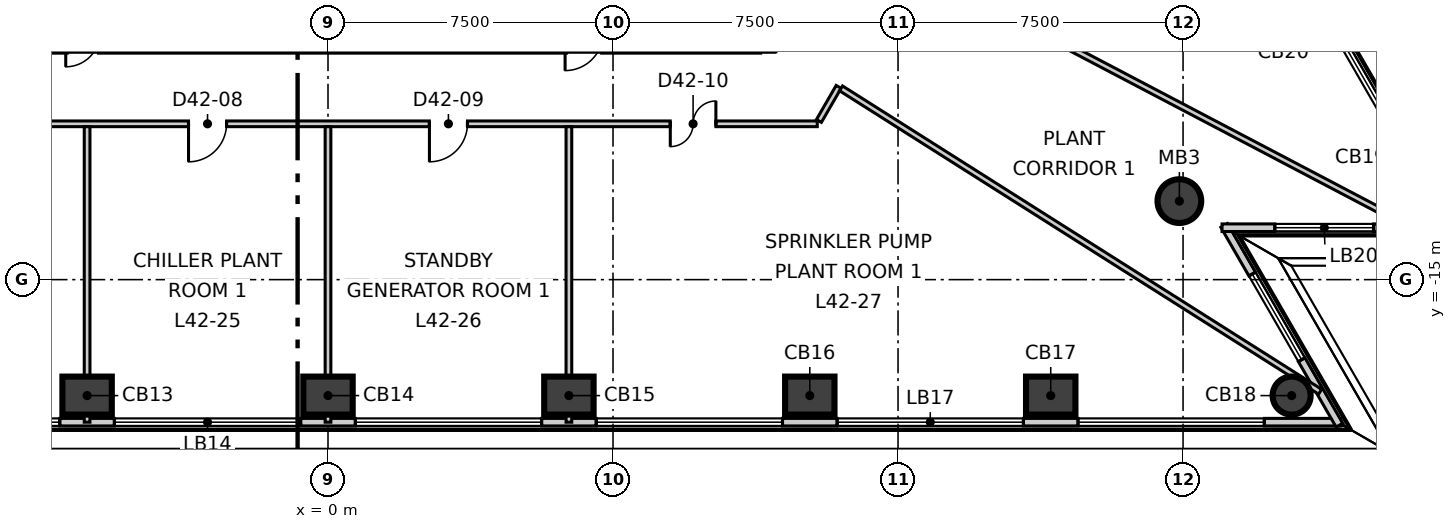
"""IFC4 building model, lengths in metres.
Left out: names, types, materials, properties, quantities, classifications, styles, units other than length and angle.
Written with IfcOpenShell. Run it as: python <this file> out.ifc"""

import sys

from ifc_helpers import new_model, si_unit, direction, frame, frame_2d, origin, origin_2d, place, context, subcontext, project, spatial, rectangle, circle, extrude, element, fill, save


model = new_model("IFC4")
c1 = context("Model", 3, precision=1e-05, world=origin(), true_north=direction((0.0, 1.0)))
c2 = subcontext(c1, "Body", "Model", "MODEL_VIEW")
j1 = project(units=[si_unit("LENGTHUNIT", "METRE"), si_unit("PLANEANGLEUNIT", "RADIAN")], contexts=[c1])
p1 = place(None, origin())
s1 = spatial("IfcSite", under=j1, at=p1, CompositionType="ELEMENT")
p2 = place(p1, origin())
s2 = spatial("IfcBuilding", under=s1, at=p2, CompositionType="ELEMENT")
p3 = place(p2, frame((0.0, 0.0, 180.8)))
s3 = spatial("IfcBuildingStorey", under=s2, at=p3, CompositionType="ELEMENT", Elevation=180.8)
for number, where, z_axis, x_axis in (
    (1, (-6.339, -18.051, -0.6), (0.0, 0.0, 1.0), (1.0, 0.0, 0.0)),
    (2, (0.0, -18.051, -0.6), (0.0, 0.0, 1.0), (1.0, 0.0, 0.0)),
    (3, (6.339, -18.051, -0.6), (0.0, 0.0, 1.0), (1.0, 0.0, 0.0)),
    (4, (12.678, -18.051, -0.6), (0.0, 0.0, 1.0), (1.0, 0.0, 0.0)),
    (5, (19.018, -18.051, -0.6), (0.0, 0.0, 1.0), (1.0, 0.0, 0.0)),
):
    element("IfcColumn", number, at=place(p3, frame(where, z_axis=z_axis, x_axis=x_axis)), inside=s3, PredefinedType="COLUMN", context=c2, shape_type="SweptSolid", body=[
        extrude(rectangle(XDim=1.3, YDim=1.0, at=origin_2d()), origin(), (0.0, 0.0, 1.0), 4.5),
    ])
p4 = place(p3, frame((25.357, -18.051, -0.6), z_axis=(0.0, 0.0, 1.0), x_axis=(1.0, 0.0, 0.0)))
e6 = element("IfcColumn", 6, at=p4, inside=s3, PredefinedType="COLUMN", context=c2, shape_type="SweptSolid", body=[
    extrude(circle(Radius=0.5, at=origin_2d()), origin(), (0.0, 0.0, 1.0), 4.5),
])
p5 = place(p3, frame((22.403, -12.934, -0.6), z_axis=(0.0, 0.0, 1.0), x_axis=(1.0, 0.0, 0.0)))
e7 = element("IfcColumn", 7, at=p5, inside=s3, PredefinedType="COLUMN", context=c2, shape_type="SweptSolid", body=[
    extrude(circle(Radius=0.575, at=origin_2d()), origin(), (0.0, 0.0, 1.0), 4.5),
])
p6 = place(p3, frame((-2.909, 32.463, 0.0), z_axis=(0.0, 0.0, 1.0), x_axis=(-0.500011769953, -0.866018608292, 0.0)))
e8 = element("IfcWall", 8, at=p6, inside=s3, PredefinedType="ELEMENTEDWALL", context=c2, shape_type="SweptSolid", body=[
    extrude(rectangle(XDim=53.299, YDim=0.2, at=frame_2d((26.649, 0.0))), origin(), (0.0, 0.0, 1.0), 3.9),
])
p7 = place(p6, frame((2.022, 0.0, 0.6)))
e9 = element("IfcOpeningElement", 9, at=p7, cuts=e8, PredefinedType="OPENING", context=c2, shape_type="SweptSolid", body=[
    extrude(rectangle(XDim=4.9, YDim=3.0, at=frame_2d((2.45, 1.5))), frame((0.0, 0.11, 0.0), z_axis=(0.0, -1.0, 0.0), x_axis=(1.0, 0.0, 0.0)), (0.0, 0.0, 1.0), 0.22),
])
p8 = place(p6, frame((8.361, 0.0, 0.6)))
e10 = element("IfcOpeningElement", 10, at=p8, cuts=e8, PredefinedType="OPENING", context=c2, shape_type="SweptSolid", body=[
    extrude(rectangle(XDim=4.9, YDim=3.0, at=frame_2d((2.45, 1.5))), frame((0.0, 0.11, 0.0), z_axis=(0.0, -1.0, 0.0), x_axis=(1.0, 0.0, 0.0)), (0.0, 0.0, 1.0), 0.22),
])
p9 = place(p6, frame((14.7, 0.0, 0.6)))
e11 = element("IfcOpeningElement", 11, at=p9, cuts=e8, PredefinedType="OPENING", context=c2, shape_type="SweptSolid", body=[
    extrude(rectangle(XDim=4.9, YDim=3.0, at=frame_2d((2.45, 1.5))), frame((0.0, 0.11, 0.0), z_axis=(0.0, -1.0, 0.0), x_axis=(1.0, 0.0, 0.0)), (0.0, 0.0, 1.0), 0.22),
])
p10 = place(p6, frame((21.04, 0.0, 0.6)))
e12 = element("IfcOpeningElement", 12, at=p10, cuts=e8, PredefinedType="OPENING", context=c2, shape_type="SweptSolid", body=[
    extrude(rectangle(XDim=4.9, YDim=3.0, at=frame_2d((2.45, 1.5))), frame((0.0, 0.11, 0.0), z_axis=(0.0, -1.0, 0.0), x_axis=(1.0, 0.0, 0.0)), (0.0, 0.0, 1.0), 0.22),
])
p11 = place(p6, frame((27.379, 0.0, 0.6)))
e13 = element("IfcOpeningElement", 13, at=p11, cuts=e8, PredefinedType="OPENING", context=c2, shape_type="SweptSolid", body=[
    extrude(rectangle(XDim=4.9, YDim=3.0, at=frame_2d((2.45, 1.5))), frame((0.0, 0.11, 0.0), z_axis=(0.0, -1.0, 0.0), x_axis=(1.0, 0.0, 0.0)), (0.0, 0.0, 1.0), 0.22),
])
p12 = place(p6, frame((33.718, 0.0, 0.6)))
e14 = element("IfcOpeningElement", 14, at=p12, cuts=e8, PredefinedType="OPENING", context=c2, shape_type="SweptSolid", body=[
    extrude(rectangle(XDim=4.9, YDim=3.0, at=frame_2d((2.45, 1.5))), frame((0.0, 0.11, 0.0), z_axis=(0.0, -1.0, 0.0), x_axis=(1.0, 0.0, 0.0)), (0.0, 0.0, 1.0), 0.22),
])
p13 = place(p6, frame((40.057, 0.0, 0.6)))
e15 = element("IfcOpeningElement", 15, at=p13, cuts=e8, PredefinedType="OPENING", context=c2, shape_type="SweptSolid", body=[
    extrude(rectangle(XDim=4.9, YDim=3.0, at=frame_2d((2.45, 1.5))), frame((0.0, 0.11, 0.0), z_axis=(0.0, -1.0, 0.0), x_axis=(1.0, 0.0, 0.0)), (0.0, 0.0, 1.0), 0.22),
])
p14 = place(p6, frame((46.396, 0.0, 0.6)))
e16 = element("IfcOpeningElement", 16, at=p14, cuts=e8, PredefinedType="OPENING", context=c2, shape_type="SweptSolid", body=[
    extrude(rectangle(XDim=4.9, YDim=3.0, at=frame_2d((2.45, 1.5))), frame((0.0, 0.11, 0.0), z_axis=(0.0, -1.0, 0.0), x_axis=(1.0, 0.0, 0.0)), (0.0, 0.0, 1.0), 0.22),
])
p15 = place(p3, frame((-26.66, -18.751, 0.0), z_axis=(0.0, 0.0, 1.0), x_axis=(1.0, 0.0, 0.0)))
e17 = element("IfcWall", 17, at=p15, inside=s3, PredefinedType="ELEMENTEDWALL", context=c2, shape_type="SweptSolid", body=[
    extrude(rectangle(XDim=53.3, YDim=0.2, at=frame_2d((26.65, 0.0))), origin(), (0.0, 0.0, 1.0), 3.9),
])
p16 = place(p15, frame((2.023, 0.0, 0.6)))
e18 = element("IfcOpeningElement", 18, at=p16, cuts=e17, PredefinedType="OPENING", context=c2, shape_type="SweptSolid", body=[
    extrude(rectangle(XDim=4.9, YDim=3.0, at=frame_2d((2.45, 1.5))), frame((0.0, 0.11, 0.0), z_axis=(0.0, -1.0, 0.0), x_axis=(1.0, 0.0, 0.0)), (0.0, 0.0, 1.0), 0.22),
])
p17 = place(p15, frame((8.362, 0.0, 0.6)))
e19 = element("IfcOpeningElement", 19, at=p17, cuts=e17, PredefinedType="OPENING", context=c2, shape_type="SweptSolid", body=[
    extrude(rectangle(XDim=4.9, YDim=3.0, at=frame_2d((2.45, 1.5))), frame((0.0, 0.11, 0.0), z_axis=(0.0, -1.0, 0.0), x_axis=(1.0, 0.0, 0.0)), (0.0, 0.0, 1.0), 0.22),
])
p18 = place(p15, frame((14.701, 0.0, 0.6)))
e20 = element("IfcOpeningElement", 20, at=p18, cuts=e17, PredefinedType="OPENING", context=c2, shape_type="SweptSolid", body=[
    extrude(rectangle(XDim=4.9, YDim=3.0, at=frame_2d((2.45, 1.5))), frame((0.0, 0.11, 0.0), z_axis=(0.0, -1.0, 0.0), x_axis=(1.0, 0.0, 0.0)), (0.0, 0.0, 1.0), 0.22),
])
p19 = place(p15, frame((21.04, 0.0, 0.6)))
e21 = element("IfcOpeningElement", 21, at=p19, cuts=e17, PredefinedType="OPENING", context=c2, shape_type="SweptSolid", body=[
    extrude(rectangle(XDim=4.9, YDim=3.0, at=frame_2d((2.45, 1.5))), frame((0.0, 0.11, 0.0), z_axis=(0.0, -1.0, 0.0), x_axis=(1.0, 0.0, 0.0)), (0.0, 0.0, 1.0), 0.22),
])
p20 = place(p15, frame((27.38, 0.0, 0.6)))
e22 = element("IfcOpeningElement", 22, at=p20, cuts=e17, PredefinedType="OPENING", context=c2, shape_type="SweptSolid", body=[
    extrude(rectangle(XDim=4.9, YDim=3.0, at=frame_2d((2.45, 1.5))), frame((0.0, 0.11, 0.0), z_axis=(0.0, -1.0, 0.0), x_axis=(1.0, 0.0, 0.0)), (0.0, 0.0, 1.0), 0.22),
])
p21 = place(p15, frame((33.719, 0.0, 0.6)))
e23 = element("IfcOpeningElement", 23, at=p21, cuts=e17, PredefinedType="OPENING", context=c2, shape_type="SweptSolid", body=[
    extrude(rectangle(XDim=4.9, YDim=3.0, at=frame_2d((2.45, 1.5))), frame((0.0, 0.11, 0.0), z_axis=(0.0, -1.0, 0.0), x_axis=(1.0, 0.0, 0.0)), (0.0, 0.0, 1.0), 0.22),
])
p22 = place(p15, frame((40.058, 0.0, 0.6)))
e24 = element("IfcOpeningElement", 24, at=p22, cuts=e17, PredefinedType="OPENING", context=c2, shape_type="SweptSolid", body=[
    extrude(rectangle(XDim=4.9, YDim=3.0, at=frame_2d((2.45, 1.5))), frame((0.0, 0.11, 0.0), z_axis=(0.0, -1.0, 0.0), x_axis=(1.0, 0.0, 0.0)), (0.0, 0.0, 1.0), 0.22),
])
p23 = place(p15, frame((46.397, 0.0, 0.6)))
e25 = element("IfcOpeningElement", 25, at=p23, cuts=e17, PredefinedType="OPENING", context=c2, shape_type="SweptSolid", body=[
    extrude(rectangle(XDim=4.9, YDim=3.0, at=frame_2d((2.45, 1.5))), frame((0.0, 0.11, 0.0), z_axis=(0.0, -1.0, 0.0), x_axis=(1.0, 0.0, 0.0)), (0.0, 0.0, 1.0), 0.22),
])
p24 = place(p3, frame((26.615, -18.829, 0.0), z_axis=(0.0, 0.0, 1.0), x_axis=(-0.499916304465, 0.866073720032, 0.0)))
e26 = element("IfcWall", 26, at=p24, inside=s3, PredefinedType="ELEMENTEDWALL", context=c2, shape_type="SweptSolid", body=[
    extrude(rectangle(XDim=6.069, YDim=0.2, at=frame_2d((3.034, 0.0))), origin(), (0.0, 0.0, 1.0), 3.9),
])
p25 = place(p24, frame((1.99, 0.0, 0.6)))
e27 = element("IfcOpeningElement", 27, at=p25, cuts=e26, PredefinedType="OPENING", context=c2, shape_type="SweptSolid", body=[
    extrude(rectangle(XDim=2.6, YDim=3.0, at=frame_2d((1.3, 1.5))), frame((0.0, 0.11, 0.0), z_axis=(0.0, -1.0, 0.0), x_axis=(1.0, 0.0, 0.0)), (0.0, 0.0, 1.0), 0.22),
])
p26 = place(p3, frame((23.526, -13.634, 0.0), z_axis=(0.0, 0.0, 1.0), x_axis=(1.0, 0.0, 0.0)))
e28 = element("IfcWall", 28, at=p26, inside=s3, PredefinedType="ELEMENTEDWALL", context=c2, shape_type="SweptSolid", body=[
    extrude(rectangle(XDim=6.068, YDim=0.2, at=frame_2d((3.034, 0.0))), origin(), (0.0, 0.0, 1.0), 3.9),
])
p27 = place(p26, frame((1.39, 0.0, 0.6)))
e29 = element("IfcOpeningElement", 29, at=p27, cuts=e28, PredefinedType="OPENING", context=c2, shape_type="SweptSolid", body=[
    extrude(rectangle(XDim=2.6, YDim=3.0, at=frame_2d((1.3, 1.5))), frame((0.0, 0.11, 0.0), z_axis=(0.0, -1.0, 0.0), x_axis=(1.0, 0.0, 0.0)), (0.0, 0.0, 1.0), 0.22),
])
p28 = place(p3, frame((29.569, -13.712, 0.0), z_axis=(0.0, 0.0, 1.0), x_axis=(-0.500011769953, 0.866018608292, 0.0)))
e30 = element("IfcWall", 30, at=p28, inside=s3, PredefinedType="ELEMENTEDWALL", context=c2, shape_type="SweptSolid", body=[
    extrude(rectangle(XDim=53.299, YDim=0.2, at=frame_2d((26.649, 0.0))), origin(), (0.0, 0.0, 1.0), 3.9),
])
p29 = place(p28, frame((2.022, 0.0, 0.6)))
e31 = element("IfcOpeningElement", 31, at=p29, cuts=e30, PredefinedType="OPENING", context=c2, shape_type="SweptSolid", body=[
    extrude(rectangle(XDim=4.9, YDim=3.0, at=frame_2d((2.45, 1.5))), frame((0.0, 0.11, 0.0), z_axis=(0.0, -1.0, 0.0), x_axis=(1.0, 0.0, 0.0)), (0.0, 0.0, 1.0), 0.22),
])
p30 = place(p28, frame((8.361, 0.0, 0.6)))
e32 = element("IfcOpeningElement", 32, at=p30, cuts=e30, PredefinedType="OPENING", context=c2, shape_type="SweptSolid", body=[
    extrude(rectangle(XDim=4.9, YDim=3.0, at=frame_2d((2.45, 1.5))), frame((0.0, 0.11, 0.0), z_axis=(0.0, -1.0, 0.0), x_axis=(1.0, 0.0, 0.0)), (0.0, 0.0, 1.0), 0.22),
])
p31 = place(p28, frame((14.701, 0.0, 0.6)))
e33 = element("IfcOpeningElement", 33, at=p31, cuts=e30, PredefinedType="OPENING", context=c2, shape_type="SweptSolid", body=[
    extrude(rectangle(XDim=4.9, YDim=3.0, at=frame_2d((2.45, 1.5))), frame((0.0, 0.11, 0.0), z_axis=(0.0, -1.0, 0.0), x_axis=(1.0, 0.0, 0.0)), (0.0, 0.0, 1.0), 0.22),
])
p32 = place(p28, frame((21.04, 0.0, 0.6)))
e34 = element("IfcOpeningElement", 34, at=p32, cuts=e30, PredefinedType="OPENING", context=c2, shape_type="SweptSolid", body=[
    extrude(rectangle(XDim=4.9, YDim=3.0, at=frame_2d((2.45, 1.5))), frame((0.0, 0.11, 0.0), z_axis=(0.0, -1.0, 0.0), x_axis=(1.0, 0.0, 0.0)), (0.0, 0.0, 1.0), 0.22),
])
p33 = place(p28, frame((27.379, 0.0, 0.6)))
e35 = element("IfcOpeningElement", 35, at=p33, cuts=e30, PredefinedType="OPENING", context=c2, shape_type="SweptSolid", body=[
    extrude(rectangle(XDim=4.9, YDim=3.0, at=frame_2d((2.45, 1.5))), frame((0.0, 0.11, 0.0), z_axis=(0.0, -1.0, 0.0), x_axis=(1.0, 0.0, 0.0)), (0.0, 0.0, 1.0), 0.22),
])
p34 = place(p28, frame((33.718, 0.0, 0.6)))
e36 = element("IfcOpeningElement", 36, at=p34, cuts=e30, PredefinedType="OPENING", context=c2, shape_type="SweptSolid", body=[
    extrude(rectangle(XDim=4.9, YDim=3.0, at=frame_2d((2.45, 1.5))), frame((0.0, 0.11, 0.0), z_axis=(0.0, -1.0, 0.0), x_axis=(1.0, 0.0, 0.0)), (0.0, 0.0, 1.0), 0.22),
])
p35 = place(p28, frame((40.057, 0.0, 0.6)))
e37 = element("IfcOpeningElement", 37, at=p35, cuts=e30, PredefinedType="OPENING", context=c2, shape_type="SweptSolid", body=[
    extrude(rectangle(XDim=4.9, YDim=3.0, at=frame_2d((2.45, 1.5))), frame((0.0, 0.11, 0.0), z_axis=(0.0, -1.0, 0.0), x_axis=(1.0, 0.0, 0.0)), (0.0, 0.0, 1.0), 0.22),
])
p36 = place(p28, frame((46.397, 0.0, 0.6)))
e38 = element("IfcOpeningElement", 38, at=p36, cuts=e30, PredefinedType="OPENING", context=c2, shape_type="SweptSolid", body=[
    extrude(rectangle(XDim=4.9, YDim=3.0, at=frame_2d((2.45, 1.5))), frame((0.0, 0.11, 0.0), z_axis=(0.0, -1.0, 0.0), x_axis=(1.0, 0.0, 0.0)), (0.0, 0.0, 1.0), 0.22),
])
p37 = place(p3, frame((-12.788, -10.9, 0.0), z_axis=(0.0, 0.0, 1.0), x_axis=(1.0, 0.0, 0.0)))
e39 = element("IfcWall", 39, at=p37, inside=s3, PredefinedType="PARTITIONING", context=c2, shape_type="SweptSolid", body=[
    extrude(rectangle(XDim=25.663, YDim=0.15, at=frame_2d((12.832, 0.0))), origin(), (0.0, 0.0, 1.0), 3.9),
])
p38 = place(p37, frame((2.581, 0.0, 0.0)))
e40 = element("IfcOpeningElement", 40, at=p38, cuts=e39, PredefinedType="OPENING", context=c2, shape_type="SweptSolid", body=[
    extrude(rectangle(XDim=1.2, YDim=2.1, at=frame_2d((0.6, 1.05))), frame((0.0, 0.085, 0.0), z_axis=(0.0, -1.0, 0.0), x_axis=(1.0, 0.0, 0.0)), (0.0, 0.0, 1.0), 0.17),
])
p39 = place(p37, frame((9.118, 0.0, 0.0)))
e41 = element("IfcOpeningElement", 41, at=p39, cuts=e39, PredefinedType="OPENING", context=c2, shape_type="SweptSolid", body=[
    extrude(rectangle(XDim=1.0, YDim=2.1, at=frame_2d((0.5, 1.05))), frame((0.0, 0.085, 0.0), z_axis=(0.0, -1.0, 0.0), x_axis=(1.0, 0.0, 0.0)), (0.0, 0.0, 1.0), 0.17),
])
p40 = place(p37, frame((15.457, 0.0, 0.0)))
e42 = element("IfcOpeningElement", 42, at=p40, cuts=e39, PredefinedType="OPENING", context=c2, shape_type="SweptSolid", body=[
    extrude(rectangle(XDim=1.0, YDim=2.1, at=frame_2d((0.5, 1.05))), frame((0.0, 0.085, 0.0), z_axis=(0.0, -1.0, 0.0), x_axis=(1.0, 0.0, 0.0)), (0.0, 0.0, 1.0), 0.17),
])
p41 = place(p37, frame((21.795, 0.0, 0.0)))
e43 = element("IfcOpeningElement", 43, at=p41, cuts=e39, PredefinedType="OPENING", context=c2, shape_type="SweptSolid", body=[
    extrude(rectangle(XDim=1.2, YDim=2.1, at=frame_2d((0.6, 1.05))), frame((0.0, 0.085, 0.0), z_axis=(0.0, -1.0, 0.0), x_axis=(1.0, 0.0, 0.0)), (0.0, 0.0, 1.0), 0.17),
])
p42 = place(p3, frame((-6.339, -18.751, 0.0), z_axis=(0.0, 0.0, 1.0), x_axis=(0.0, 1.0, 0.0)))
e44 = element("IfcWall", 44, at=p42, inside=s3, PredefinedType="PARTITIONING", context=c2, shape_type="SweptSolid", body=[
    extrude(rectangle(XDim=7.776, YDim=0.15, at=frame_2d((3.888, 0.0))), origin(), (0.0, 0.0, 1.0), 3.9),
])
p43 = place(p3, frame((0.0, -18.751, 0.0), z_axis=(0.0, 0.0, 1.0), x_axis=(0.0, 1.0, 0.0)))
e45 = element("IfcWall", 45, at=p43, inside=s3, PredefinedType="PARTITIONING", context=c2, shape_type="SweptSolid", body=[
    extrude(rectangle(XDim=7.776, YDim=0.15, at=frame_2d((3.888, 0.0))), origin(), (0.0, 0.0, 1.0), 3.4),
])
p44 = place(p3, frame((6.339, -18.751, 0.0), z_axis=(0.0, 0.0, 1.0), x_axis=(0.0, 1.0, 0.0)))
e46 = element("IfcWall", 46, at=p44, inside=s3, PredefinedType="PARTITIONING", context=c2, shape_type="SweptSolid", body=[
    extrude(rectangle(XDim=7.776, YDim=0.15, at=frame_2d((3.888, 0.0))), origin(), (0.0, 0.0, 1.0), 3.9),
])
p45 = place(p3, frame((12.918, -10.825, 0.0), z_axis=(0.0, 0.0, 1.0), x_axis=(0.500442301859, 0.865769890046, 0.0)))
e47 = element("IfcWall", 47, at=p45, inside=s3, PredefinedType="PARTITIONING", context=c2, shape_type="SweptSolid", body=[
    extrude(rectangle(XDim=1.037, YDim=0.15, at=frame_2d((0.519, 0.0))), origin(), (0.0, 0.0, 1.0), 3.9),
])
p46 = place(p3, frame((13.5, -9.967, 0.0), z_axis=(0.0, 0.0, 1.0), x_axis=(0.844863939608, -0.534981236634, 0.0)))
e48 = element("IfcWall", 48, at=p46, inside=s3, PredefinedType="PARTITIONING", context=c2, shape_type="SweptSolid", body=[
    extrude(rectangle(XDim=14.922, YDim=0.15, at=frame_2d((7.461, 0.0))), origin(), (0.0, 0.0, 1.0), 3.2),
])
p47 = place(p3, frame((15.375, -6.719, 0.0), z_axis=(0.0, 0.0, 1.0), x_axis=(0.885374935021, -0.464877644586, 0.0)))
e49 = element("IfcWall", 49, at=p47, inside=s3, PredefinedType="PARTITIONING", context=c2, shape_type="SweptSolid", body=[
    extrude(rectangle(XDim=14.875, YDim=0.15, at=frame_2d((7.438, 0.0))), origin(), (0.0, 0.0, 1.0), 3.2),
])
p48 = place(p18, origin())
e50 = element("IfcWindow", 50, at=p48, inside=s3, PartitioningType="SINGLE_PANEL", PredefinedType="WINDOW", context=c2, shape_type="SweptSolid", body=[
    extrude(rectangle(XDim=4.9, YDim=3.0, at=frame_2d((2.45, 1.5))), frame((0.0, 0.03, 0.0), z_axis=(0.0, -1.0, 0.0), x_axis=(1.0, 0.0, 0.0)), (0.0, 0.0, 1.0), 0.06),
])
fill(e20, e50)
p49 = place(p19, origin())
e51 = element("IfcWindow", 51, at=p49, inside=s3, PartitioningType="SINGLE_PANEL", PredefinedType="WINDOW", context=c2, shape_type="SweptSolid", body=[
    extrude(rectangle(XDim=4.9, YDim=3.0, at=frame_2d((2.45, 1.5))), frame((0.0, 0.03, 0.0), z_axis=(0.0, -1.0, 0.0), x_axis=(1.0, 0.0, 0.0)), (0.0, 0.0, 1.0), 0.06),
])
fill(e21, e51)
p50 = place(p20, origin())
e52 = element("IfcWindow", 52, at=p50, inside=s3, PartitioningType="SINGLE_PANEL", PredefinedType="WINDOW", context=c2, shape_type="SweptSolid", body=[
    extrude(rectangle(XDim=4.9, YDim=3.0, at=frame_2d((2.45, 1.5))), frame((0.0, 0.03, 0.0), z_axis=(0.0, -1.0, 0.0), x_axis=(1.0, 0.0, 0.0)), (0.0, 0.0, 1.0), 0.06),
])
fill(e22, e52)
p51 = place(p21, origin())
e53 = element("IfcWindow", 53, at=p51, inside=s3, PartitioningType="SINGLE_PANEL", PredefinedType="WINDOW", context=c2, shape_type="SweptSolid", body=[
    extrude(rectangle(XDim=4.9, YDim=3.0, at=frame_2d((2.45, 1.5))), frame((0.0, 0.03, 0.0), z_axis=(0.0, -1.0, 0.0), x_axis=(1.0, 0.0, 0.0)), (0.0, 0.0, 1.0), 0.06),
])
fill(e23, e53)
p52 = place(p22, origin())
e54 = element("IfcWindow", 54, at=p52, inside=s3, PartitioningType="SINGLE_PANEL", PredefinedType="WINDOW", context=c2, shape_type="SweptSolid", body=[
    extrude(rectangle(XDim=4.9, YDim=3.0, at=frame_2d((2.45, 1.5))), frame((0.0, 0.03, 0.0), z_axis=(0.0, -1.0, 0.0), x_axis=(1.0, 0.0, 0.0)), (0.0, 0.0, 1.0), 0.06),
])
fill(e24, e54)
p53 = place(p23, origin())
e55 = element("IfcWindow", 55, at=p53, inside=s3, PartitioningType="SINGLE_PANEL", PredefinedType="WINDOW", context=c2, shape_type="SweptSolid", body=[
    extrude(rectangle(XDim=4.9, YDim=3.0, at=frame_2d((2.45, 1.5))), frame((0.0, 0.03, 0.0), z_axis=(0.0, -1.0, 0.0), x_axis=(1.0, 0.0, 0.0)), (0.0, 0.0, 1.0), 0.06),
])
fill(e25, e55)
p54 = place(p25, origin())
e56 = element("IfcWindow", 56, at=p54, inside=s3, PartitioningType="SINGLE_PANEL", PredefinedType="WINDOW", context=c2, shape_type="SweptSolid", body=[
    extrude(rectangle(XDim=2.6, YDim=3.0, at=frame_2d((1.3, 1.5))), frame((0.0, 0.03, 0.0), z_axis=(0.0, -1.0, 0.0), x_axis=(1.0, 0.0, 0.0)), (0.0, 0.0, 1.0), 0.06),
])
fill(e27, e56)
p55 = place(p27, origin())
e57 = element("IfcWindow", 57, at=p55, inside=s3, PartitioningType="SINGLE_PANEL", PredefinedType="WINDOW", context=c2, shape_type="SweptSolid", body=[
    extrude(rectangle(XDim=2.6, YDim=3.0, at=frame_2d((1.3, 1.5))), frame((0.0, 0.03, 0.0), z_axis=(0.0, -1.0, 0.0), x_axis=(1.0, 0.0, 0.0)), (0.0, 0.0, 1.0), 0.06),
])
fill(e29, e57)
p56 = place(p29, origin())
e58 = element("IfcWindow", 58, at=p56, inside=s3, PartitioningType="SINGLE_PANEL", PredefinedType="WINDOW", context=c2, shape_type="SweptSolid", body=[
    extrude(rectangle(XDim=4.9, YDim=3.0, at=frame_2d((2.45, 1.5))), frame((0.0, 0.03, 0.0), z_axis=(0.0, -1.0, 0.0), x_axis=(1.0, 0.0, 0.0)), (0.0, 0.0, 1.0), 0.06),
])
fill(e31, e58)
p57 = place(p39, origin())
e59 = element("IfcDoor", 59, at=p57, inside=s3, OperationType="SINGLE_SWING_LEFT", PredefinedType="DOOR", context=c2, shape_type="SweptSolid", body=[
    extrude(rectangle(XDim=1.0, YDim=2.1, at=frame_2d((0.5, 1.05))), frame((0.0, 0.025, 0.0), z_axis=(0.0, -1.0, 0.0), x_axis=(1.0, 0.0, 0.0)), (0.0, 0.0, 1.0), 0.05),
])
fill(e41, e59)
p58 = place(p40, origin())
e60 = element("IfcDoor", 60, at=p58, inside=s3, OperationType="SINGLE_SWING_LEFT", PredefinedType="DOOR", context=c2, shape_type="SweptSolid", body=[
    extrude(rectangle(XDim=1.0, YDim=2.1, at=frame_2d((0.5, 1.05))), frame((0.0, 0.025, 0.0), z_axis=(0.0, -1.0, 0.0), x_axis=(1.0, 0.0, 0.0)), (0.0, 0.0, 1.0), 0.05),
])
fill(e42, e60)
p59 = place(p41, origin())
e61 = element("IfcDoor", 61, at=p59, inside=s3, OperationType="DOUBLE_DOOR_SINGLE_SWING", PredefinedType="DOOR", context=c2, shape_type="SweptSolid", body=[
    extrude(rectangle(XDim=1.2, YDim=2.1, at=frame_2d((0.6, 1.05))), frame((0.0, 0.025, 0.0), z_axis=(0.0, -1.0, 0.0), x_axis=(1.0, 0.0, 0.0)), (0.0, 0.0, 1.0), 0.05),
])
fill(e43, e61)
save(model, sys.argv[1])
